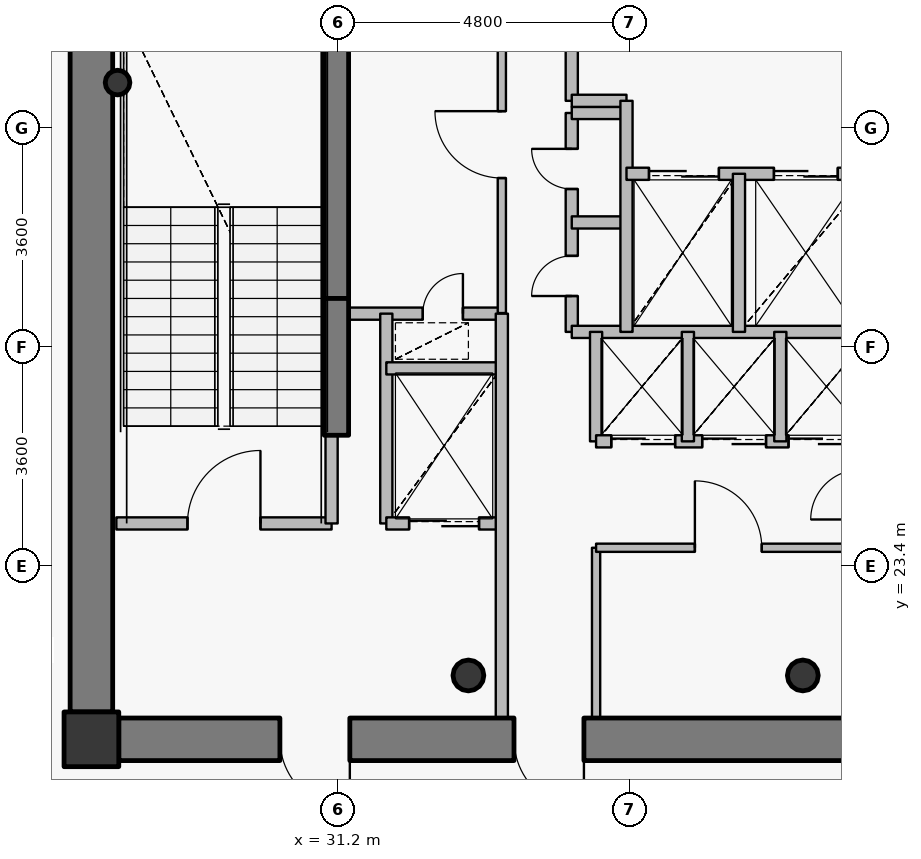
"""IFC4 building model, lengths in metres.
Left out: names, types, materials, properties, quantities, classifications, styles, units other than length and angle.
Written with IfcOpenShell. Run it as: python <this file> out.ifc"""

import sys

from ifc_helpers import new_model, si_unit, direction, frame, frame_2d, origin, origin_2d, place, context, subcontext, project, spatial, rectangle, hollow_circle, extrude, source, transform, mapped, element, fill, save


model = new_model("IFC4")
c1 = context("Model", 3, precision=1e-05, world=origin(), true_north=direction((0.0, 1.0)))
c2 = subcontext(c1, "Body", "Model", "MODEL_VIEW")
j1 = project(units=[si_unit("LENGTHUNIT", "METRE"), si_unit("PLANEANGLEUNIT", "RADIAN")], contexts=[c1])
p1 = place(None, origin())
s1 = spatial("IfcSite", under=j1, at=p1, CompositionType="ELEMENT")
p2 = place(p1, origin())
s2 = spatial("IfcBuilding", under=s1, at=p2, CompositionType="ELEMENT")
p3 = place(p2, frame((0.0, 0.0, 327.8)))
s3 = spatial("IfcBuildingStorey", under=s2, at=p3, CompositionType="ELEMENT", Elevation=327.8)
p4 = place(p3, frame((27.15, 20.55, 0.0), z_axis=(0.0, 0.0, 1.0), x_axis=(1.0, 0.0, 0.0)))
e1 = element("IfcColumn", 1, at=p4, inside=s3, PredefinedType="COLUMN", context=c2, shape_type="SweptSolid", body=[
    extrude(rectangle(XDim=0.9, YDim=0.9, at=origin_2d()), origin(), (0.0, 0.0, 1.0), 3.8),
])
for number, where, z_axis, x_axis in (
    (2, (33.35, 21.6, 0.0), (0.0, 0.0, 1.0), (1.0, 0.0, 0.0)),
    (3, (38.85, 21.6, 0.0), (0.0, 0.0, 1.0), (1.0, 0.0, 0.0)),
):
    element("IfcColumn", number, at=place(p3, frame(where, z_axis=z_axis, x_axis=x_axis)), inside=s3, PredefinedType="COLUMN", context=c2, shape_type="SweptSolid", body=[
        extrude(hollow_circle(Radius=0.254, WallThickness=0.02, at=origin_2d()), origin(), (0.0, 0.0, 1.0), 3.8),
    ])
p5 = place(p3, frame((31.18, 27.8, 0.0), z_axis=(0.0, 0.0, 1.0), x_axis=(0.0, 1.0, 0.0)))
e4 = element("IfcWall", 4, at=p5, inside=s3, PredefinedType="SHEAR", context=c2, shape_type="SweptSolid", body=[
    extrude(rectangle(XDim=4.75, YDim=0.4, at=frame_2d((2.375, 0.0))), origin(), (0.0, 0.0, 1.0), 3.8),
])
p6 = place(p3, frame((27.58, 31.35, 0.0), z_axis=(0.0, 0.0, 1.0), x_axis=(1.0, 0.0, 0.0)))
e5 = element("IfcColumn", 5, at=p6, inside=s3, PredefinedType="COLUMN", context=c2, shape_type="SweptSolid", body=[
    extrude(hollow_circle(Radius=0.203, WallThickness=0.016, at=origin_2d()), origin(), (0.0, 0.0, 1.0), 3.8),
])
p7 = place(p3, frame((44.4, 20.55, 0.0), z_axis=(0.0, 0.0, 1.0), x_axis=(-1.0, 0.0, 0.0)))
e6 = element("IfcWall", 6, at=p7, inside=s3, PredefinedType="SHEAR", context=c2, shape_type="SweptSolid", body=[
    extrude(rectangle(XDim=16.8, YDim=0.7, at=frame_2d((8.4, 0.0))), origin(), (0.0, 0.0, 1.0), 3.1),
])
p8 = place(p7, frame((13.0, 0.0, 0.0)))
e7 = element("IfcOpeningElement", 7, at=p8, cuts=e6, PredefinedType="OPENING", context=c2, shape_type="SweptSolid", body=[
    extrude(rectangle(XDim=1.15, YDim=2.15, at=origin_2d()), frame((0.575, 0.36, 1.075), z_axis=(0.0, -1.0, 0.0), x_axis=(1.0, 0.0, 0.0)), (0.0, 0.0, 1.0), 0.72),
])
p9 = place(p7, frame((9.15, 0.0, 0.0)))
e8 = element("IfcOpeningElement", 8, at=p9, cuts=e6, PredefinedType="OPENING", context=c2, shape_type="SweptSolid", body=[
    extrude(rectangle(XDim=1.15, YDim=2.15, at=origin_2d()), frame((0.575, 0.36, 1.075), z_axis=(0.0, -1.0, 0.0), x_axis=(1.0, 0.0, 0.0)), (0.0, 0.0, 1.0), 0.72),
])
p10 = place(p3, frame((27.15, 21.0, 0.0), z_axis=(0.0, 0.0, 1.0), x_axis=(0.0, 1.0, 0.0)))
e9 = element("IfcWall", 9, at=p10, inside=s3, PredefinedType="SHEAR", context=c2, shape_type="SweptSolid", body=[
    extrude(rectangle(XDim=12.0, YDim=0.7, at=frame_2d((6.0, 0.0))), origin(), (0.0, 0.0, 1.0), 3.1),
])
p11 = place(p3, frame((31.18, 25.55, 0.0), z_axis=(0.0, 0.0, 1.0), x_axis=(0.0, 1.0, 0.0)))
e10 = element("IfcWall", 10, at=p11, inside=s3, PredefinedType="SHEAR", context=c2, shape_type="SweptSolid", body=[
    extrude(rectangle(XDim=2.25, YDim=0.4, at=frame_2d((1.125, 0.0))), origin(), (0.0, 0.0, 1.0), 3.15),
])
p12 = place(p3, frame((27.56, 24.1, 0.0), z_axis=(0.0, 0.0, 1.0), x_axis=(1.0, 0.0, 0.0)))
e11 = element("IfcWall", 11, at=p12, inside=s3, PredefinedType="PARTITIONING", context=c2, shape_type="SweptSolid", body=[
    extrude(rectangle(XDim=3.54, YDim=0.2, at=frame_2d((1.77, 0.0))), origin(), (0.0, 0.0, 1.0), 3.55),
])
p13 = place(p12, frame((1.17, 0.0, 0.0)))
e12 = element("IfcOpeningElement", 12, at=p13, cuts=e11, PredefinedType="OPENING", context=c2, shape_type="SweptSolid", body=[
    extrude(rectangle(XDim=1.2, YDim=2.15, at=origin_2d()), frame((0.6, 0.11, 1.075), z_axis=(0.0, -1.0, 0.0), x_axis=(1.0, 0.0, 0.0)), (0.0, 0.0, 1.0), 0.22),
])
p14 = place(p3, frame((31.1, 24.1, 0.0), z_axis=(0.0, 0.0, 1.0), x_axis=(0.0, 1.0, 0.0)))
e13 = element("IfcWall", 13, at=p14, inside=s3, PredefinedType="PARTITIONING", context=c2, shape_type="SweptSolid", body=[
    extrude(rectangle(XDim=1.44, YDim=0.2, at=frame_2d((0.72, 0.0))), origin(), (0.0, 0.0, 1.0), 3.55),
])
p15 = place(p3, frame((31.1, 27.55, 0.0), z_axis=(0.0, 0.0, 1.0), x_axis=(1.0, 0.0, 0.0)))
e14 = element("IfcWall", 14, at=p15, inside=s3, PredefinedType="PARTITIONING", context=c2, shape_type="SweptSolid", body=[
    extrude(rectangle(XDim=2.8, YDim=0.2, at=frame_2d((1.4, 0.0))), origin(), (0.0, 0.0, 1.0), 3.135),
])
p16 = place(p15, frame((1.5, 0.0, 0.0)))
e15 = element("IfcOpeningElement", 15, at=p16, cuts=e14, PredefinedType="OPENING", context=c2, shape_type="SweptSolid", body=[
    extrude(rectangle(XDim=0.66, YDim=2.05, at=origin_2d()), frame((0.33, 0.11, 1.025), z_axis=(0.0, -1.0, 0.0), x_axis=(1.0, 0.0, 0.0)), (0.0, 0.0, 1.0), 0.22),
])
p17 = place(p3, frame((32.0, 24.1, 0.0), z_axis=(0.0, 0.0, 1.0), x_axis=(0.0, 1.0, 0.0)))
e16 = element("IfcWall", 16, at=p17, inside=s3, PredefinedType="PARTITIONING", context=c2, shape_type="SweptSolid", body=[
    extrude(rectangle(XDim=3.45, YDim=0.2, at=frame_2d((1.725, 0.0))), origin(), (0.0, 0.0, 1.0), 3.55),
])
p18 = place(p3, frame((32.0, 24.1, 0.0), z_axis=(0.0, 0.0, 1.0), x_axis=(1.0, 0.0, 0.0)))
e17 = element("IfcWall", 17, at=p18, inside=s3, PredefinedType="PARTITIONING", context=c2, shape_type="SweptSolid", body=[
    extrude(rectangle(XDim=1.9, YDim=0.2, at=frame_2d((0.95, 0.0))), origin(), (0.0, 0.0, 1.0), 3.135),
])
p19 = place(p18, frame((0.375, 0.0, 0.0)))
e18 = element("IfcOpeningElement", 18, at=p19, cuts=e17, PredefinedType="OPENING", context=c2, shape_type="SweptSolid", body=[
    extrude(rectangle(XDim=1.15, YDim=2.15, at=origin_2d()), frame((0.575, 0.11, 1.075), z_axis=(0.0, -1.0, 0.0), x_axis=(1.0, 0.0, 0.0)), (0.0, 0.0, 1.0), 0.22),
])
p20 = place(p3, frame((32.0, 26.65, 0.0), z_axis=(0.0, 0.0, 1.0), x_axis=(1.0, 0.0, 0.0)))
e19 = element("IfcWall", 19, at=p20, inside=s3, PredefinedType="PARTITIONING", context=c2, shape_type="SweptSolid", body=[
    extrude(rectangle(XDim=1.9, YDim=0.2, at=frame_2d((0.95, 0.0))), origin(), (0.0, 0.0, 1.0), 3.135),
])
p21 = place(p3, frame((33.9, 20.9, 0.0), z_axis=(0.0, 0.0, 1.0), x_axis=(0.0, 1.0, 0.0)))
e20 = element("IfcWall", 20, at=p21, inside=s3, PredefinedType="PARTITIONING", context=c2, shape_type="SweptSolid", body=[
    extrude(rectangle(XDim=6.65, YDim=0.2, at=frame_2d((3.325, 0.0))), origin(), (0.0, 0.0, 1.0), 3.135),
])
p22 = place(p3, frame((33.9, 27.56, 0.0), z_axis=(0.0, 0.0, 1.0), x_axis=(0.0, 1.0, 0.0)))
e21 = element("IfcWall", 21, at=p22, inside=s3, PredefinedType="PARTITIONING", context=c2, shape_type="SweptSolid", body=[
    extrude(rectangle(XDim=5.54, YDim=0.135, at=frame_2d((2.77, 0.0))), origin(), (0.0, 0.0, 1.0), 3.135),
])
p23 = place(p22, frame((2.22, 0.0, 0.0)))
e22 = element("IfcOpeningElement", 22, at=p23, cuts=e21, PredefinedType="OPENING", context=c2, shape_type="SweptSolid", body=[
    extrude(rectangle(XDim=1.1, YDim=2.15, at=origin_2d()), frame((0.55, 0.078, 1.075), z_axis=(0.0, -1.0, 0.0), x_axis=(1.0, 0.0, 0.0)), (0.0, 0.0, 1.0), 0.155),
])
p24 = place(p3, frame((35.05, 27.25, 0.0), z_axis=(0.0, 0.0, 1.0), x_axis=(0.0, 1.0, 0.0)))
e23 = element("IfcWall", 23, at=p24, inside=s3, PredefinedType="PARTITIONING", context=c2, shape_type="SweptSolid", body=[
    extrude(rectangle(XDim=3.6, YDim=0.2, at=frame_2d((1.8, 0.0))), origin(), (0.0, 0.0, 1.0), 3.55),
])
p25 = place(p24, frame((0.59, 0.0, 0.0)))
e24 = element("IfcOpeningElement", 24, at=p25, cuts=e23, PredefinedType="OPENING", context=c2, shape_type="SweptSolid", body=[
    extrude(rectangle(XDim=0.66, YDim=2.05, at=origin_2d()), frame((0.33, 0.11, 1.025), z_axis=(0.0, -1.0, 0.0), x_axis=(1.0, 0.0, 0.0)), (0.0, 0.0, 1.0), 0.22),
])
p26 = place(p24, frame((2.35, 0.0, 0.0)))
e25 = element("IfcOpeningElement", 25, at=p26, cuts=e23, PredefinedType="OPENING", context=c2, shape_type="SweptSolid", body=[
    extrude(rectangle(XDim=0.66, YDim=2.05, at=origin_2d()), frame((0.33, 0.11, 1.025), z_axis=(0.0, -1.0, 0.0), x_axis=(1.0, 0.0, 0.0)), (0.0, 0.0, 1.0), 0.22),
])
p27 = place(p3, frame((35.05, 27.25, 0.0), z_axis=(0.0, 0.0, 1.0), x_axis=(1.0, 0.0, 0.0)))
e26 = element("IfcWall", 26, at=p27, inside=s3, PredefinedType="PARTITIONING", context=c2, shape_type="SweptSolid", body=[
    extrude(rectangle(XDim=4.95, YDim=0.2, at=frame_2d((2.475, 0.0))), origin(), (0.0, 0.0, 1.0), 3.135),
])
for number, where, z_axis, x_axis in (
    (27, (35.05, 29.05, 0.0), (0.0, 0.0, 1.0), (1.0, 0.0, 0.0)),
    (28, (35.05, 30.85, 0.0), (0.0, 0.0, 1.0), (1.0, 0.0, 0.0)),
):
    element("IfcWall", number, at=place(p3, frame(where, z_axis=z_axis, x_axis=x_axis)), inside=s3, PredefinedType="PARTITIONING", context=c2, shape_type="SweptSolid", body=[
        extrude(rectangle(XDim=0.9, YDim=0.2, at=frame_2d((0.45, 0.0))), origin(), (0.0, 0.0, 1.0), 3.55),
    ])
p28 = place(p3, frame((35.05, 31.05, 0.0), z_axis=(0.0, 0.0, 1.0), x_axis=(0.0, 1.0, 0.0)))
e29 = element("IfcWall", 29, at=p28, inside=s3, PredefinedType="PARTITIONING", context=c2, shape_type="SweptSolid", body=[
    extrude(rectangle(XDim=2.05, YDim=0.2, at=frame_2d((1.025, 0.0))), origin(), (0.0, 0.0, 1.0), 3.135),
])
p29 = place(p3, frame((35.05, 31.05, 0.0), z_axis=(0.0, 0.0, 1.0), x_axis=(1.0, 0.0, 0.0)))
e30 = element("IfcWall", 30, at=p29, inside=s3, PredefinedType="PARTITIONING", context=c2, shape_type="SweptSolid", body=[
    extrude(rectangle(XDim=0.9, YDim=0.2, at=frame_2d((0.45, 0.0))), origin(), (0.0, 0.0, 1.0), 3.55),
])
p30 = place(p3, frame((35.45, 20.9, 0.0), z_axis=(0.0, 0.0, 1.0), x_axis=(0.0, 1.0, 0.0)))
e31 = element("IfcWall", 31, at=p30, inside=s3, PredefinedType="PARTITIONING", context=c2, shape_type="SweptSolid", body=[
    extrude(rectangle(XDim=2.8, YDim=0.135, at=frame_2d((1.4, 0.0))), origin(), (0.0, 0.0, 1.0), 3.135),
])
p31 = place(p3, frame((35.45, 23.7, 0.0), z_axis=(0.0, 0.0, 1.0), x_axis=(1.0, 0.0, 0.0)))
e32 = element("IfcWall", 32, at=p31, inside=s3, PredefinedType="PARTITIONING", context=c2, shape_type="SweptSolid", body=[
    extrude(rectangle(XDim=4.35, YDim=0.135, at=frame_2d((2.175, 0.0))), origin(), (0.0, 0.0, 1.0), 3.135),
])
p32 = place(p31, frame((1.625, 0.0, 0.0)))
e33 = element("IfcOpeningElement", 33, at=p32, cuts=e32, PredefinedType="OPENING", context=c2, shape_type="SweptSolid", body=[
    extrude(rectangle(XDim=1.1, YDim=2.15, at=origin_2d()), frame((0.55, 0.078, 1.075), z_axis=(0.0, -1.0, 0.0), x_axis=(1.0, 0.0, 0.0)), (0.0, 0.0, 1.0), 0.155),
])
p33 = place(p3, frame((35.45, 25.45, 0.0), z_axis=(0.0, 0.0, 1.0), x_axis=(0.0, 1.0, 0.0)))
e34 = element("IfcWall", 34, at=p33, inside=s3, PredefinedType="PARTITIONING", context=c2, shape_type="SweptSolid", body=[
    extrude(rectangle(XDim=1.8, YDim=0.2, at=frame_2d((0.9, 0.0))), origin(), (0.0, 0.0, 1.0), 3.55),
])
p34 = place(p3, frame((35.45, 25.45, 0.0), z_axis=(0.0, 0.0, 1.0), x_axis=(1.0, 0.0, 0.0)))
e35 = element("IfcWall", 35, at=p34, inside=s3, PredefinedType="PARTITIONING", context=c2, shape_type="SweptSolid", body=[
    extrude(rectangle(XDim=4.55, YDim=0.2, at=frame_2d((2.275, 0.0))), origin(), (0.0, 0.0, 1.0), 3.135),
])
p35 = place(p34, frame((0.25, 0.0, 0.0)))
e36 = element("IfcOpeningElement", 36, at=p35, cuts=e35, PredefinedType="OPENING", context=c2, shape_type="SweptSolid", body=[
    extrude(rectangle(XDim=1.05, YDim=2.15, at=origin_2d()), frame((0.525, 0.11, 1.075), z_axis=(0.0, -1.0, 0.0), x_axis=(1.0, 0.0, 0.0)), (0.0, 0.0, 1.0), 0.22),
])
p36 = place(p34, frame((1.745, 0.0, 0.0)))
e37 = element("IfcOpeningElement", 37, at=p36, cuts=e35, PredefinedType="OPENING", context=c2, shape_type="SweptSolid", body=[
    extrude(rectangle(XDim=1.05, YDim=2.15, at=origin_2d()), frame((0.525, 0.11, 1.075), z_axis=(0.0, -1.0, 0.0), x_axis=(1.0, 0.0, 0.0)), (0.0, 0.0, 1.0), 0.22),
])
p37 = place(p34, frame((3.165, 0.0, 0.0)))
e38 = element("IfcOpeningElement", 38, at=p37, cuts=e35, PredefinedType="OPENING", context=c2, shape_type="SweptSolid", body=[
    extrude(rectangle(XDim=1.05, YDim=2.15, at=origin_2d()), frame((0.525, 0.11, 1.075), z_axis=(0.0, -1.0, 0.0), x_axis=(1.0, 0.0, 0.0)), (0.0, 0.0, 1.0), 0.22),
])
p38 = place(p3, frame((35.95, 27.25, 0.0), z_axis=(0.0, 0.0, 1.0), x_axis=(0.0, 1.0, 0.0)))
e39 = element("IfcWall", 39, at=p38, inside=s3, PredefinedType="PARTITIONING", context=c2, shape_type="SweptSolid", body=[
    extrude(rectangle(XDim=3.8, YDim=0.2, at=frame_2d((1.9, 0.0))), origin(), (0.0, 0.0, 1.0), 3.55),
])
p39 = place(p3, frame((35.95, 29.85, 0.0), z_axis=(0.0, 0.0, 1.0), x_axis=(1.0, 0.0, 0.0)))
e40 = element("IfcWall", 40, at=p39, inside=s3, PredefinedType="PARTITIONING", context=c2, shape_type="SweptSolid", body=[
    extrude(rectangle(XDim=8.49, YDim=0.2, at=frame_2d((4.245, 0.0))), origin(), (0.0, 0.0, 1.0), 3.135),
])
p40 = place(p39, frame((6.1, 0.0, 0.0)))
e41 = element("IfcOpeningElement", 41, at=p40, cuts=e40, PredefinedType="OPENING", context=c2, shape_type="SweptSolid", body=[
    extrude(rectangle(XDim=1.2, YDim=2.15, at=origin_2d()), frame((0.6, 0.11, 1.075), z_axis=(0.0, -1.0, 0.0), x_axis=(1.0, 0.0, 0.0)), (0.0, 0.0, 1.0), 0.22),
])
p41 = place(p39, frame((0.37, 0.0, 0.0)))
e42 = element("IfcOpeningElement", 42, at=p41, cuts=e40, PredefinedType="OPENING", context=c2, shape_type="SweptSolid", body=[
    extrude(rectangle(XDim=1.15, YDim=2.15, at=origin_2d()), frame((0.575, 0.11, 1.075), z_axis=(0.0, -1.0, 0.0), x_axis=(1.0, 0.0, 0.0)), (0.0, 0.0, 1.0), 0.22),
])
p42 = place(p39, frame((2.425, 0.0, 0.0)))
e43 = element("IfcOpeningElement", 43, at=p42, cuts=e40, PredefinedType="OPENING", context=c2, shape_type="SweptSolid", body=[
    extrude(rectangle(XDim=1.05, YDim=2.15, at=origin_2d()), frame((0.525, 0.11, 1.075), z_axis=(0.0, -1.0, 0.0), x_axis=(1.0, 0.0, 0.0)), (0.0, 0.0, 1.0), 0.22),
])
p43 = place(p3, frame((36.96, 25.45, 0.0), z_axis=(0.0, 0.0, 1.0), x_axis=(0.0, 1.0, 0.0)))
e44 = element("IfcWall", 44, at=p43, inside=s3, PredefinedType="PARTITIONING", context=c2, shape_type="SweptSolid", body=[
    extrude(rectangle(XDim=1.8, YDim=0.2, at=frame_2d((0.9, 0.0))), origin(), (0.0, 0.0, 1.0), 3.55),
])
p44 = place(p3, frame((37.8, 27.25, 0.0), z_axis=(0.0, 0.0, 1.0), x_axis=(0.0, 1.0, 0.0)))
e45 = element("IfcWall", 45, at=p44, inside=s3, PredefinedType="PARTITIONING", context=c2, shape_type="SweptSolid", body=[
    extrude(rectangle(XDim=2.6, YDim=0.2, at=frame_2d((1.3, 0.0))), origin(), (0.0, 0.0, 1.0), 3.55),
])
p45 = place(p3, frame((38.48, 25.45, 0.0), z_axis=(0.0, 0.0, 1.0), x_axis=(0.0, 1.0, 0.0)))
e46 = element("IfcWall", 46, at=p45, inside=s3, PredefinedType="PARTITIONING", context=c2, shape_type="SweptSolid", body=[
    extrude(rectangle(XDim=1.8, YDim=0.2, at=frame_2d((0.9, 0.0))), origin(), (0.0, 0.0, 1.0), 3.55),
])
p46 = place(p3, frame((26.8, 20.99, 0.0), z_axis=(0.0, 0.0, 1.0), x_axis=(0.0, -1.0, 0.0)))
e47 = element("IfcWall", 47, at=p46, inside=s3, PredefinedType="PARTITIONING", context=c2, shape_type="SweptSolid", body=[
    extrude(rectangle(XDim=0.79, YDim=0.135, at=frame_2d((0.395, 0.0))), origin(), (0.0, 0.0, 1.0), 3.085),
])
p47 = place(p3, frame((27.107, 20.2, 0.0), z_axis=(0.0, 0.0, 1.0), x_axis=(1.0, 0.0, 0.0)))
e48 = element("IfcWall", 48, at=p47, inside=s3, PredefinedType="PARTITIONING", context=c2, shape_type="SweptSolid", body=[
    extrude(rectangle(XDim=0.483, YDim=0.135, at=frame_2d((0.241, 0.0))), origin(), (0.0, 0.0, 1.0), 3.085),
])
m1 = source(origin(), c2, "Body", "SweptSolid", [
    extrude(rectangle(XDim=1.15, YDim=2.15, at=origin_2d()), frame((0.575, 0.025, 1.075), z_axis=(0.0, -1.0, 0.0), x_axis=(1.0, 0.0, 0.0)), (0.0, 0.0, 1.0), 0.05),
])
p48 = place(p8, origin())
e49 = element("IfcDoor", 49, at=p48, inside=s3, OperationType="SINGLE_SWING_LEFT", PredefinedType="DOOR", context=c2, shape_type="MappedRepresentation", body=[
    mapped(m1, transform((0.0, 0.0, 0.0), x_axis=(1.0, 0.0, 0.0), y_axis=(0.0, 1.0, 0.0), z_axis=(0.0, 0.0, 1.0), scale=1.0)),
])
fill(e7, e49)
p49 = place(p9, origin())
e50 = element("IfcDoor", 50, at=p49, inside=s3, OperationType="SINGLE_SWING_LEFT", PredefinedType="DOOR", context=c2, shape_type="MappedRepresentation", body=[
    mapped(m1, transform((0.0, 0.0, 0.0), x_axis=(1.0, 0.0, 0.0), y_axis=(0.0, 1.0, 0.0), z_axis=(0.0, 0.0, 1.0), scale=1.0)),
])
fill(e8, e50)
m2 = source(origin(), c2, "Body", "SweptSolid", [
    extrude(rectangle(XDim=1.2, YDim=2.15, at=origin_2d()), frame((0.6, 0.025, 1.075), z_axis=(0.0, -1.0, 0.0), x_axis=(1.0, 0.0, 0.0)), (0.0, 0.0, 1.0), 0.05),
])
p50 = place(p13, origin())
e51 = element("IfcDoor", 51, at=p50, inside=s3, OperationType="SINGLE_SWING_RIGHT", PredefinedType="DOOR", context=c2, shape_type="MappedRepresentation", body=[
    mapped(m2, transform((0.0, 0.0, 0.0), x_axis=(1.0, 0.0, 0.0), y_axis=(0.0, 1.0, 0.0), z_axis=(0.0, 0.0, 1.0), scale=1.0)),
])
fill(e12, e51)
m3 = source(origin(), c2, "Body", "SweptSolid", [
    extrude(rectangle(XDim=1.15, YDim=2.15, at=origin_2d()), frame((0.575, 0.025, 1.075), z_axis=(0.0, -1.0, 0.0), x_axis=(1.0, 0.0, 0.0)), (0.0, 0.0, 1.0), 0.05),
])
p51 = place(p41, origin())
e52 = element("IfcDoor", 52, at=p51, inside=s3, OperationType="DOUBLE_DOOR_SLIDING", PredefinedType="USERDEFINED", context=c2, shape_type="MappedRepresentation", body=[
    mapped(m3, transform((0.0, 0.0, 0.0), x_axis=(1.0, 0.0, 0.0), y_axis=(0.0, 1.0, 0.0), z_axis=(0.0, 0.0, 1.0), scale=1.0)),
])
fill(e42, e52)
p52 = place(p19, origin())
e53 = element("IfcDoor", 53, at=p52, inside=s3, OperationType="DOUBLE_DOOR_SLIDING", PredefinedType="USERDEFINED", context=c2, shape_type="MappedRepresentation", body=[
    mapped(m3, transform((0.0, 0.0, 0.0), x_axis=(1.0, 0.0, 0.0), y_axis=(0.0, 1.0, 0.0), z_axis=(0.0, 0.0, 1.0), scale=1.0)),
])
fill(e18, e53)
m4 = source(origin(), c2, "Body", "SweptSolid", [
    extrude(rectangle(XDim=1.05, YDim=2.15, at=origin_2d()), frame((0.525, 0.025, 1.075), z_axis=(0.0, -1.0, 0.0), x_axis=(1.0, 0.0, 0.0)), (0.0, 0.0, 1.0), 0.05),
])
p53 = place(p42, origin())
e54 = element("IfcDoor", 54, at=p53, inside=s3, OperationType="DOUBLE_DOOR_SLIDING", PredefinedType="USERDEFINED", context=c2, shape_type="MappedRepresentation", body=[
    mapped(m4, transform((0.0, 0.0, 0.0), x_axis=(1.0, 0.0, 0.0), y_axis=(0.0, 1.0, 0.0), z_axis=(0.0, 0.0, 1.0), scale=1.0)),
])
fill(e43, e54)
p54 = place(p35, origin())
e55 = element("IfcDoor", 55, at=p54, inside=s3, OperationType="DOUBLE_DOOR_SLIDING", PredefinedType="USERDEFINED", context=c2, shape_type="MappedRepresentation", body=[
    mapped(m4, transform((0.0, 0.0, 0.0), x_axis=(1.0, 0.0, 0.0), y_axis=(0.0, 1.0, 0.0), z_axis=(0.0, 0.0, 1.0), scale=1.0)),
])
fill(e36, e55)
p55 = place(p36, origin())
e56 = element("IfcDoor", 56, at=p55, inside=s3, OperationType="DOUBLE_DOOR_SLIDING", PredefinedType="USERDEFINED", context=c2, shape_type="MappedRepresentation", body=[
    mapped(m4, transform((0.0, 0.0, 0.0), x_axis=(1.0, 0.0, 0.0), y_axis=(0.0, 1.0, 0.0), z_axis=(0.0, 0.0, 1.0), scale=1.0)),
])
fill(e37, e56)
p56 = place(p37, origin())
e57 = element("IfcDoor", 57, at=p56, inside=s3, OperationType="DOUBLE_DOOR_SLIDING", PredefinedType="USERDEFINED", context=c2, shape_type="MappedRepresentation", body=[
    mapped(m4, transform((0.0, 0.0, 0.0), x_axis=(1.0, 0.0, 0.0), y_axis=(0.0, 1.0, 0.0), z_axis=(0.0, 0.0, 1.0), scale=1.0)),
])
fill(e38, e57)
m5 = source(origin(), c2, "Body", "SweptSolid", [
    extrude(rectangle(XDim=0.66, YDim=2.05, at=origin_2d()), frame((0.33, 0.025, 1.025), z_axis=(0.0, -1.0, 0.0), x_axis=(1.0, 0.0, 0.0)), (0.0, 0.0, 1.0), 0.05),
])
p57 = place(p25, origin())
e58 = element("IfcDoor", 58, at=p57, inside=s3, OperationType="SINGLE_SWING_LEFT", PredefinedType="USERDEFINED", context=c2, shape_type="MappedRepresentation", body=[
    mapped(m5, transform((0.0, 0.0, 0.0), x_axis=(1.0, 0.0, 0.0), y_axis=(0.0, 1.0, 0.0), z_axis=(0.0, 0.0, 1.0), scale=1.0)),
])
fill(e24, e58)
p58 = place(p26, origin())
e59 = element("IfcDoor", 59, at=p58, inside=s3, OperationType="SINGLE_SWING_RIGHT", PredefinedType="USERDEFINED", context=c2, shape_type="MappedRepresentation", body=[
    mapped(m5, transform((0.0, 0.0, 0.0), x_axis=(1.0, 0.0, 0.0), y_axis=(0.0, 1.0, 0.0), z_axis=(0.0, 0.0, 1.0), scale=1.0)),
])
fill(e25, e59)
m6 = source(origin(), c2, "Body", "SweptSolid", [
    extrude(rectangle(XDim=1.1, YDim=2.15, at=origin_2d()), frame((0.55, 0.025, 1.075), z_axis=(0.0, -1.0, 0.0), x_axis=(1.0, 0.0, 0.0)), (0.0, 0.0, 1.0), 0.05),
])
p59 = place(p32, origin())
e60 = element("IfcDoor", 60, at=p59, inside=s3, OperationType="SINGLE_SWING_LEFT", PredefinedType="DOOR", context=c2, shape_type="MappedRepresentation", body=[
    mapped(m6, transform((0.0, 0.0, 0.0), x_axis=(1.0, 0.0, 0.0), y_axis=(0.0, 1.0, 0.0), z_axis=(0.0, 0.0, 1.0), scale=1.0)),
])
fill(e33, e60)
p60 = place(p23, origin())
e61 = element("IfcDoor", 61, at=p60, inside=s3, OperationType="SINGLE_SWING_RIGHT", PredefinedType="DOOR", context=c2, shape_type="MappedRepresentation", body=[
    mapped(m6, transform((0.0, 0.0, 0.0), x_axis=(1.0, 0.0, 0.0), y_axis=(0.0, 1.0, 0.0), z_axis=(0.0, 0.0, 1.0), scale=1.0)),
])
fill(e22, e61)
p61 = place(p16, origin())
e62 = element("IfcDoor", 62, at=p61, inside=s3, OperationType="SINGLE_SWING_RIGHT", PredefinedType="USERDEFINED", context=c2, shape_type="MappedRepresentation", body=[
    mapped(m5, transform((0.0, 0.0, 0.0), x_axis=(1.0, 0.0, 0.0), y_axis=(0.0, 1.0, 0.0), z_axis=(0.0, 0.0, 1.0), scale=1.0)),
])
fill(e15, e62)
save(model, sys.argv[1])
